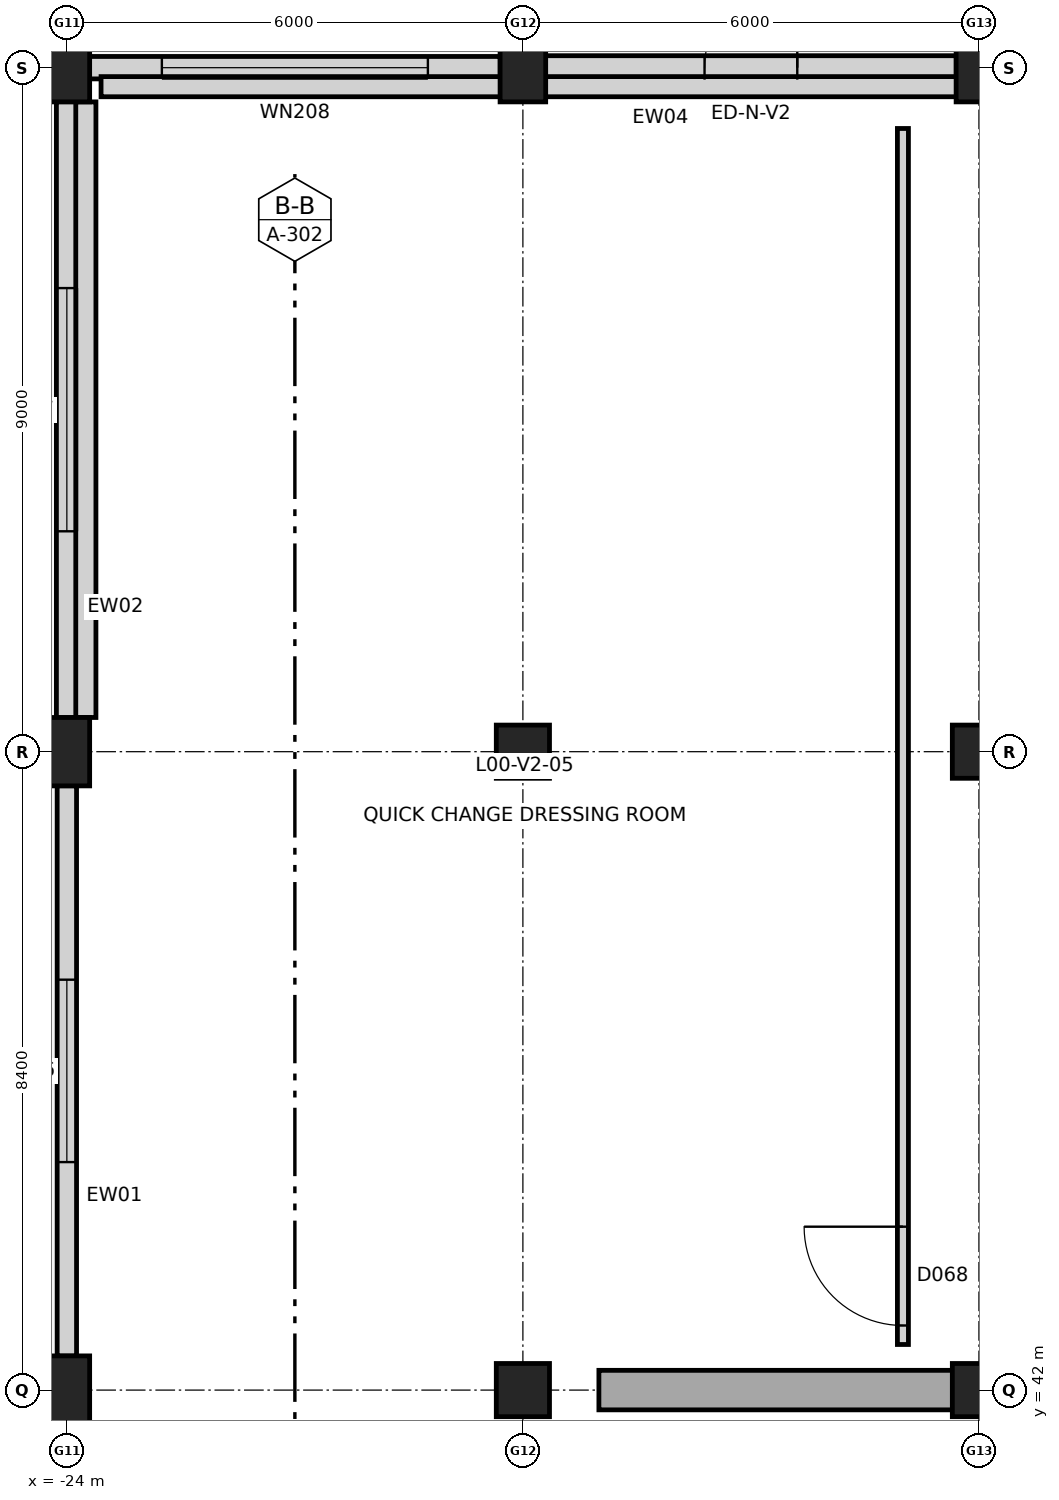
"""IFC4 building model, lengths in metres.
Left out: names, types, materials, properties, quantities, classifications, styles, units other than length and angle.
Written with IfcOpenShell. Run it as: python <this file> out.ifc"""

import sys

from ifc_helpers import new_model, si_unit, direction, frame, frame_2d, origin, origin_2d, place, context, subcontext, project, spatial, rectangle, extrude, element, fill, save


model = new_model("IFC4")
c1 = context("Model", 3, precision=1e-05, world=origin(), true_north=direction((0.0, 1.0)))
c2 = subcontext(c1, "Body", "Model", "MODEL_VIEW")
j1 = project(units=[si_unit("LENGTHUNIT", "METRE"), si_unit("PLANEANGLEUNIT", "RADIAN")], contexts=[c1])
p1 = place(None, origin())
s1 = spatial("IfcSite", under=j1, at=p1, CompositionType="ELEMENT")
p2 = place(p1, origin())
s2 = spatial("IfcBuilding", under=s1, at=p2, CompositionType="ELEMENT")
p3 = place(p2, origin())
s3 = spatial("IfcBuildingStorey", under=s2, at=p3, CompositionType="ELEMENT", Elevation=0.0)
for number, where, z_axis, x_axis in (
    (1, (-24.0, 42.0, 0.0), (0.0, 0.0, 1.0), (1.0, 0.0, 0.0)),
    (2, (-24.0, 50.4, 0.0), (0.0, 0.0, 1.0), (1.0, 0.0, 0.0)),
    (3, (-24.0, 59.4, 0.0), (0.0, 0.0, 1.0), (1.0, 0.0, 0.0)),
):
    element("IfcColumn", number, at=place(p3, frame(where, z_axis=z_axis, x_axis=x_axis)), inside=s3, PredefinedType="COLUMN", context=c2, shape_type="SweptSolid", body=[
        extrude(rectangle(XDim=0.6, YDim=0.9, at=origin_2d()), origin(), (0.0, 0.0, 1.0), 5.4),
    ])
for number, where, z_axis, x_axis in (
    (4, (-18.0, 42.0, 0.0), (0.0, 0.0, 1.0), (1.0, 0.0, 0.0)),
    (5, (-18.0, 50.4, 0.0), (0.0, 0.0, 1.0), (1.0, 0.0, 0.0)),
):
    element("IfcColumn", number, at=place(p3, frame(where, z_axis=z_axis, x_axis=x_axis)), inside=s3, PredefinedType="COLUMN", context=c2, shape_type="SweptSolid", body=[
        extrude(rectangle(XDim=0.7, YDim=0.7, at=origin_2d()), origin(), (0.0, 0.0, 1.0), 5.4),
    ])
p4 = place(p3, frame((-18.0, 59.4, 0.0), z_axis=(0.0, 0.0, 1.0), x_axis=(1.0, 0.0, 0.0)))
e6 = element("IfcColumn", 6, at=p4, inside=s3, PredefinedType="COLUMN", context=c2, shape_type="SweptSolid", body=[
    extrude(rectangle(XDim=0.6, YDim=0.9, at=origin_2d()), origin(), (0.0, 0.0, 1.0), 5.4),
])
for number, where, z_axis, x_axis in (
    (7, (-12.0, 42.0, 0.0), (0.0, 0.0, 1.0), (1.0, 0.0, 0.0)),
    (8, (-12.0, 50.4, 0.0), (0.0, 0.0, 1.0), (1.0, 0.0, 0.0)),
):
    element("IfcColumn", number, at=place(p3, frame(where, z_axis=z_axis, x_axis=x_axis)), inside=s3, PredefinedType="COLUMN", context=c2, shape_type="SweptSolid", body=[
        extrude(rectangle(XDim=0.7, YDim=0.7, at=origin_2d()), origin(), (0.0, 0.0, 1.0), 5.4),
    ])
p5 = place(p3, frame((-12.0, 59.4, 0.0), z_axis=(0.0, 0.0, 1.0), x_axis=(1.0, 0.0, 0.0)))
e9 = element("IfcColumn", 9, at=p5, inside=s3, PredefinedType="COLUMN", context=c2, shape_type="SweptSolid", body=[
    extrude(rectangle(XDim=0.6, YDim=0.9, at=origin_2d()), origin(), (0.0, 0.0, 1.0), 5.4),
])
p6 = place(p3, frame((-17.0, 42.0, 0.0), z_axis=(0.0, 0.0, 1.0), x_axis=(1.0, 0.0, 0.0)))
e10 = element("IfcWall", 10, at=p6, inside=s3, PredefinedType="SHEAR", context=c2, shape_type="SweptSolid", body=[
    extrude(rectangle(XDim=23.0, YDim=0.52, at=frame_2d((11.5, 0.0))), origin(), (0.0, 0.0, 1.0), 5.4),
])
p7 = place(p3, frame((-24.0, 42.448, 0.0), z_axis=(0.0, 0.0, 1.0), x_axis=(0.0, 1.0, 0.0)))
e11 = element("IfcWall", 11, at=p7, inside=s3, PredefinedType="STANDARD", context=c2, shape_type="SweptSolid", body=[
    extrude(rectangle(XDim=7.504, YDim=0.255, at=frame_2d((3.752, 0.0))), origin(), (0.0, 0.0, 1.0), 4.404),
])
p8 = place(p7, frame((2.552, 0.0, 0.6)))
e12 = element("IfcOpeningElement", 12, at=p8, cuts=e11, PredefinedType="OPENING", context=c2, shape_type="SweptSolid", body=[
    extrude(rectangle(XDim=2.4, YDim=2.35, at=frame_2d((1.2, 1.175))), frame((0.0, 0.137, 0.0), z_axis=(0.0, -1.0, 0.0), x_axis=(1.0, 0.0, 0.0)), (0.0, 0.0, 1.0), 0.275),
])
p9 = place(p3, frame((-24.0, 50.848, 0.0), z_axis=(0.0, 0.0, 1.0), x_axis=(0.0, 1.0, 0.0)))
e13 = element("IfcWall", 13, at=p9, inside=s3, PredefinedType="STANDARD", context=c2, shape_type="SweptSolid", body=[
    extrude(rectangle(XDim=8.104, YDim=0.275, at=frame_2d((4.052, 0.0))), origin(), (0.0, 0.0, 1.0), 4.429),
])
p10 = place(p9, frame((2.452, 0.0, 0.85)))
e14 = element("IfcOpeningElement", 14, at=p10, cuts=e13, PredefinedType="OPENING", context=c2, shape_type="SweptSolid", body=[
    extrude(rectangle(XDim=3.2, YDim=1.45, at=frame_2d((1.6, 0.725))), frame((0.0, 0.147, 0.0), z_axis=(0.0, -1.0, 0.0), x_axis=(1.0, 0.0, 0.0)), (0.0, 0.0, 1.0), 0.295),
])
p11 = place(p3, frame((-23.702, 59.4, 0.0), z_axis=(0.0, 0.0, 1.0), x_axis=(1.0, 0.0, 0.0)))
e15 = element("IfcWall", 15, at=p11, inside=s3, PredefinedType="STANDARD", context=c2, shape_type="SweptSolid", body=[
    extrude(rectangle(XDim=5.404, YDim=0.295, at=frame_2d((2.702, 0.0))), origin(), (0.0, 0.0, 1.0), 4.345),
])
p12 = place(p11, frame((0.952, 0.0, 0.85)))
e16 = element("IfcOpeningElement", 16, at=p12, cuts=e15, PredefinedType="OPENING", context=c2, shape_type="SweptSolid", body=[
    extrude(rectangle(XDim=3.5, YDim=1.45, at=frame_2d((1.75, 0.725))), frame((0.0, 0.157, 0.0), z_axis=(0.0, -1.0, 0.0), x_axis=(1.0, 0.0, 0.0)), (0.0, 0.0, 1.0), 0.315),
])
p13 = place(p3, frame((-17.702, 59.4, 0.0), z_axis=(0.0, 0.0, 1.0), x_axis=(1.0, 0.0, 0.0)))
e17 = element("IfcWall", 17, at=p13, inside=s3, PredefinedType="STANDARD", context=c2, shape_type="SweptSolid", body=[
    extrude(rectangle(XDim=5.404, YDim=0.315, at=frame_2d((2.702, 0.0))), origin(), (0.0, 0.0, 1.0), 4.345),
])
p14 = place(p13, frame((2.092, 0.0, 0.0)))
e18 = element("IfcOpeningElement", 18, at=p14, cuts=e17, PredefinedType="OPENING", context=c2, shape_type="SweptSolid", body=[
    extrude(rectangle(XDim=1.22, YDim=2.3, at=frame_2d((0.61, 1.15))), frame((0.0, 0.167, 0.0), z_axis=(0.0, -1.0, 0.0), x_axis=(1.0, 0.0, 0.0)), (0.0, 0.0, 1.0), 0.335),
])
p15 = place(p3, frame((29.55, 59.15, 5.4), z_axis=(0.0, 0.0, 1.0), x_axis=(-1.0, 0.0, 0.0)))
e19 = element("IfcWall", 19, at=p15, inside=s3, PredefinedType="PARAPET", context=c2, shape_type="SweptSolid", body=[
    extrude(rectangle(XDim=53.1, YDim=0.265, at=frame_2d((26.55, 0.0))), origin(), (0.0, 0.0, 1.0), 1.15),
])
p16 = place(p3, frame((-23.75, 58.95, 5.4), z_axis=(0.0, 0.0, 1.0), x_axis=(0.0, -1.0, 0.0)))
e20 = element("IfcWall", 20, at=p16, inside=s3, PredefinedType="PARAPET", context=c2, shape_type="SweptSolid", body=[
    extrude(rectangle(XDim=8.1, YDim=0.265, at=frame_2d((4.05, 0.0))), origin(), (0.0, 0.0, 1.0), 1.15),
])
p17 = place(p3, frame((-13.0, 42.6, 0.0), z_axis=(0.0, 0.0, 1.0), x_axis=(0.0, 1.0, 0.0)))
e21 = element("IfcWall", 21, at=p17, inside=s3, PredefinedType="PARTITIONING", context=c2, shape_type="SweptSolid", body=[
    extrude(rectangle(XDim=16.0, YDim=0.145, at=frame_2d((8.0, 0.0))), origin(), (0.0, 0.0, 1.0), 5.02),
])
p18 = place(p17, frame((0.25, 0.0, 0.0)))
e22 = element("IfcOpeningElement", 22, at=p18, cuts=e21, PredefinedType="OPENING", context=c2, shape_type="SweptSolid", body=[
    extrude(rectangle(XDim=1.3, YDim=2.25, at=frame_2d((0.65, 1.125))), frame((0.0, 0.083, 0.0), z_axis=(0.0, -1.0, 0.0), x_axis=(1.0, 0.0, 0.0)), (0.0, 0.0, 1.0), 0.165),
])
p19 = place(p8, origin())
e23 = element("IfcWindow", 23, at=p19, inside=s3, PartitioningType="SINGLE_PANEL", PredefinedType="WINDOW", context=c2, shape_type="SweptSolid", body=[
    extrude(rectangle(XDim=2.4, YDim=2.35, at=frame_2d((1.2, 1.175))), frame((0.0, 0.03, 0.0), z_axis=(0.0, -1.0, 0.0), x_axis=(1.0, 0.0, 0.0)), (0.0, 0.0, 1.0), 0.06),
])
fill(e12, e23)
p20 = place(p10, origin())
e24 = element("IfcWindow", 24, at=p20, inside=s3, PartitioningType="SINGLE_PANEL", PredefinedType="WINDOW", context=c2, shape_type="SweptSolid", body=[
    extrude(rectangle(XDim=3.2, YDim=1.45, at=frame_2d((1.6, 0.725))), frame((0.0, 0.03, 0.0), z_axis=(0.0, -1.0, 0.0), x_axis=(1.0, 0.0, 0.0)), (0.0, 0.0, 1.0), 0.06),
])
fill(e14, e24)
p21 = place(p12, origin())
e25 = element("IfcWindow", 25, at=p21, inside=s3, PartitioningType="SINGLE_PANEL", PredefinedType="WINDOW", context=c2, shape_type="SweptSolid", body=[
    extrude(rectangle(XDim=3.5, YDim=1.45, at=frame_2d((1.75, 0.725))), frame((0.0, 0.03, 0.0), z_axis=(0.0, -1.0, 0.0), x_axis=(1.0, 0.0, 0.0)), (0.0, 0.0, 1.0), 0.06),
])
fill(e16, e25)
p22 = place(p14, origin())
e26 = element("IfcDoor", 26, at=p22, inside=s3, OperationType="SINGLE_SWING_RIGHT", PredefinedType="DOOR", context=c2, shape_type="SweptSolid", body=[
    extrude(rectangle(XDim=1.22, YDim=2.3, at=frame_2d((0.61, 1.15))), frame((0.0, 0.025, 0.0), z_axis=(0.0, -1.0, 0.0), x_axis=(1.0, 0.0, 0.0)), (0.0, 0.0, 1.0), 0.05),
])
fill(e18, e26)
p23 = place(p18, origin())
e27 = element("IfcDoor", 27, at=p23, inside=s3, OperationType="SINGLE_SWING_RIGHT", PredefinedType="DOOR", context=c2, shape_type="SweptSolid", body=[
    extrude(rectangle(XDim=1.3, YDim=2.25, at=frame_2d((0.65, 1.125))), frame((0.0, 0.025, 0.0), z_axis=(0.0, -1.0, 0.0), x_axis=(1.0, 0.0, 0.0)), (0.0, 0.0, 1.0), 0.05),
])
fill(e22, e27)
save(model, sys.argv[1])
